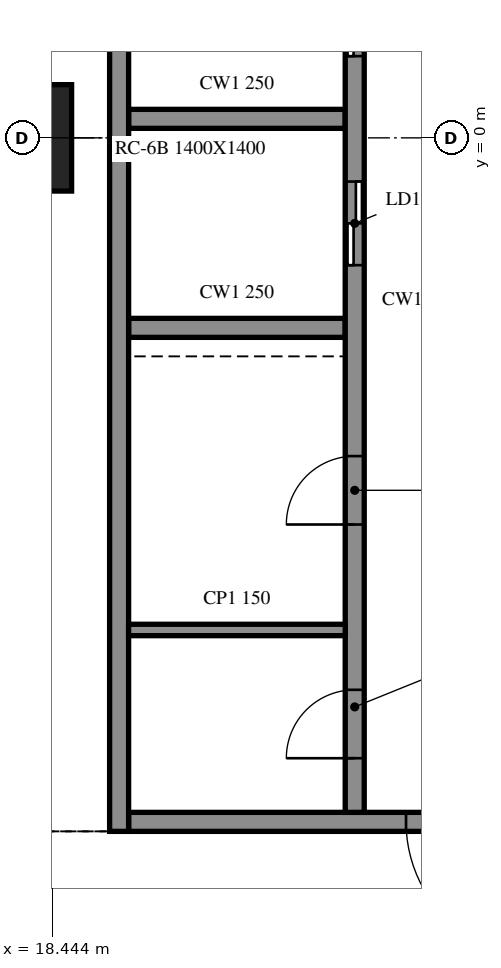
"""IFC4 building model, lengths in metres.
Left out: names, types, materials, properties, quantities, classifications, styles, units other than length and angle.
Written with IfcOpenShell. Run it as: python <this file> out.ifc"""

import sys

from ifc_helpers import new_model, si_unit, direction, frame, frame_2d, origin, origin_2d, place, context, subcontext, project, spatial, rectangle, extrude, element, fill, save


model = new_model("IFC4")
c1 = context("Model", 3, precision=1e-05, world=origin(), true_north=direction((0.0, 1.0)))
c2 = subcontext(c1, "Body", "Model", "MODEL_VIEW")
j1 = project(units=[si_unit("LENGTHUNIT", "METRE"), si_unit("PLANEANGLEUNIT", "RADIAN")], contexts=[c1])
p1 = place(None, origin())
s1 = spatial("IfcSite", under=j1, at=p1, CompositionType="ELEMENT")
p2 = place(p1, origin())
s2 = spatial("IfcBuilding", under=s1, at=p2, CompositionType="ELEMENT")
p3 = place(p2, frame((0.0, 0.0, 117.6)))
s3 = spatial("IfcBuildingStorey", under=s2, at=p3, CompositionType="ELEMENT", Elevation=117.6)
p4 = place(p3, frame((18.0, 0.0, -0.55), z_axis=(0.0, 0.0, 1.0), x_axis=(1.0, 0.0, 0.0)))
e1 = element("IfcColumn", 1, at=p4, inside=s3, PredefinedType="COLUMN", context=c2, shape_type="SweptSolid", body=[
    extrude(rectangle(XDim=1.4, YDim=1.4, at=origin_2d()), origin(), (0.0, 0.0, 1.0), 4.61),
])
p5 = place(p3, frame((19.325, 15.125, 0.0), z_axis=(0.0, 0.0, 1.0), x_axis=(0.0, -1.0, 0.0)))
e2 = element("IfcWall", 2, at=p5, inside=s3, PredefinedType="SOLIDWALL", context=c2, shape_type="SweptSolid", body=[
    extrude(rectangle(XDim=24.25, YDim=0.25, at=frame_2d((12.125, 0.0))), origin(), (0.0, 0.0, 1.0), 4.06),
])
p6 = place(p3, frame((28.55, -9.0, 0.0), z_axis=(0.0, 0.0, 1.0), x_axis=(-1.0, 0.0, 0.0)))
e3 = element("IfcWall", 3, at=p6, inside=s3, PredefinedType="SOLIDWALL", context=c2, shape_type="SweptSolid", body=[
    extrude(rectangle(XDim=9.1, YDim=0.25, at=frame_2d((4.55, 0.0))), origin(), (0.0, 0.0, 1.0), 4.06),
])
p7 = place(p6, frame((3.65, 0.0, 0.0)))
e4 = element("IfcOpeningElement", 4, at=p7, cuts=e3, PredefinedType="OPENING", context=c2, shape_type="SweptSolid", body=[
    extrude(rectangle(XDim=1.8, YDim=2.1, at=frame_2d((0.9, 1.05))), frame((0.0, 0.135, 0.0), z_axis=(0.0, -1.0, 0.0), x_axis=(1.0, 0.0, 0.0)), (0.0, 0.0, 1.0), 0.27),
])
p8 = place(p3, frame((22.425, -8.875, 0.0), z_axis=(0.0, 0.0, 1.0), x_axis=(0.0, 1.0, 0.0)))
e5 = element("IfcWall", 5, at=p8, inside=s3, PredefinedType="SOLIDWALL", context=c2, shape_type="SweptSolid", body=[
    extrude(rectangle(XDim=17.5, YDim=0.25, at=frame_2d((8.75, 0.0))), origin(), (0.0, 0.0, 1.0), 4.06),
])
p9 = place(p8, frame((7.2, 0.0, 0.0)))
e6 = element("IfcOpeningElement", 6, at=p9, cuts=e5, PredefinedType="OPENING", context=c2, shape_type="SweptSolid", body=[
    extrude(rectangle(XDim=1.1, YDim=2.1, at=frame_2d((0.55, 1.05))), frame((0.0, 0.135, 0.0), z_axis=(0.0, -1.0, 0.0), x_axis=(1.0, 0.0, 0.0)), (0.0, 0.0, 1.0), 0.27),
])
p10 = place(p8, frame((9.95, 0.0, 0.0)))
e7 = element("IfcOpeningElement", 7, at=p10, cuts=e5, PredefinedType="OPENING", context=c2, shape_type="SweptSolid", body=[
    extrude(rectangle(XDim=1.1, YDim=2.1, at=frame_2d((0.55, 1.05))), frame((0.0, 0.135, 0.0), z_axis=(0.0, -1.0, 0.0), x_axis=(1.0, 0.0, 0.0)), (0.0, 0.0, 1.0), 0.27),
])
p11 = place(p8, frame((12.7, 0.0, 0.0)))
e8 = element("IfcOpeningElement", 8, at=p11, cuts=e5, PredefinedType="OPENING", context=c2, shape_type="SweptSolid", body=[
    extrude(rectangle(XDim=1.1, YDim=2.1, at=frame_2d((0.55, 1.05))), frame((0.0, 0.135, 0.0), z_axis=(0.0, -1.0, 0.0), x_axis=(1.0, 0.0, 0.0)), (0.0, 0.0, 1.0), 0.27),
])
p12 = place(p8, frame((15.45, 0.0, 0.0)))
e9 = element("IfcOpeningElement", 9, at=p12, cuts=e5, PredefinedType="OPENING", context=c2, shape_type="SweptSolid", body=[
    extrude(rectangle(XDim=1.1, YDim=2.1, at=frame_2d((0.55, 1.05))), frame((0.0, 0.135, 0.0), z_axis=(0.0, -1.0, 0.0), x_axis=(1.0, 0.0, 0.0)), (0.0, 0.0, 1.0), 0.27),
])
p13 = place(p8, frame((0.712, 0.0, 0.0)))
e10 = element("IfcOpeningElement", 10, at=p13, cuts=e5, PredefinedType="OPENING", context=c2, shape_type="SweptSolid", body=[
    extrude(rectangle(XDim=0.9, YDim=2.1, at=frame_2d((0.45, 1.05))), frame((0.0, 0.135, 0.0), z_axis=(0.0, -1.0, 0.0), x_axis=(1.0, 0.0, 0.0)), (0.0, 0.0, 1.0), 0.27),
])
p14 = place(p8, frame((3.788, 0.0, 0.0)))
e11 = element("IfcOpeningElement", 11, at=p14, cuts=e5, PredefinedType="OPENING", context=c2, shape_type="SweptSolid", body=[
    extrude(rectangle(XDim=0.9, YDim=2.1, at=frame_2d((0.45, 1.05))), frame((0.0, 0.135, 0.0), z_axis=(0.0, -1.0, 0.0), x_axis=(1.0, 0.0, 0.0)), (0.0, 0.0, 1.0), 0.27),
])
for number, where, z_axis, x_axis in (
    (12, (19.45, -2.5, 0.0), (0.0, 0.0, 1.0), (1.0, 0.0, 0.0)),
    (13, (19.45, 0.25, 0.0), (0.0, 0.0, 1.0), (1.0, 0.0, 0.0)),
):
    element("IfcWall", number, at=place(p3, frame(where, z_axis=z_axis, x_axis=x_axis)), inside=s3, PredefinedType="SOLIDWALL", context=c2, shape_type="SweptSolid", body=[
        extrude(rectangle(XDim=2.85, YDim=0.25, at=frame_2d((1.425, 0.0))), origin(), (0.0, 0.0, 1.0), 4.06),
    ])
p15 = place(p3, frame((19.45, -6.475, 0.0), z_axis=(0.0, 0.0, 1.0), x_axis=(1.0, 0.0, 0.0)))
e14 = element("IfcWall", 14, at=p15, inside=s3, PredefinedType="PARTITIONING", context=c2, shape_type="SweptSolid", body=[
    extrude(rectangle(XDim=2.85, YDim=0.15, at=frame_2d((1.425, 0.0))), origin(), (0.0, 0.0, 1.0), 4.06),
])
p16 = place(p7, origin())
e15 = element("IfcDoor", 15, at=p16, inside=s3, OperationType="DOUBLE_DOOR_SINGLE_SWING", PredefinedType="DOOR", context=c2, shape_type="SweptSolid", body=[
    extrude(rectangle(XDim=1.8, YDim=2.1, at=frame_2d((0.9, 1.05))), frame((0.0, 0.025, 0.0), z_axis=(0.0, -1.0, 0.0), x_axis=(1.0, 0.0, 0.0)), (0.0, 0.0, 1.0), 0.05),
])
fill(e4, e15)
p17 = place(p9, origin())
e16 = element("IfcDoor", 16, at=p17, inside=s3, OperationType="DOUBLE_DOOR_SLIDING", PredefinedType="DOOR", context=c2, shape_type="SweptSolid", body=[
    extrude(rectangle(XDim=1.1, YDim=2.1, at=frame_2d((0.55, 1.05))), frame((0.0, 0.025, 0.0), z_axis=(0.0, -1.0, 0.0), x_axis=(1.0, 0.0, 0.0)), (0.0, 0.0, 1.0), 0.05),
])
fill(e6, e16)
p18 = place(p10, origin())
e17 = element("IfcDoor", 17, at=p18, inside=s3, OperationType="DOUBLE_DOOR_SLIDING", PredefinedType="DOOR", context=c2, shape_type="SweptSolid", body=[
    extrude(rectangle(XDim=1.1, YDim=2.1, at=frame_2d((0.55, 1.05))), frame((0.0, 0.025, 0.0), z_axis=(0.0, -1.0, 0.0), x_axis=(1.0, 0.0, 0.0)), (0.0, 0.0, 1.0), 0.05),
])
fill(e7, e17)
p19 = place(p13, origin())
e18 = element("IfcDoor", 18, at=p19, inside=s3, OperationType="SINGLE_SWING_LEFT", PredefinedType="DOOR", context=c2, shape_type="SweptSolid", body=[
    extrude(rectangle(XDim=0.9, YDim=2.1, at=frame_2d((0.45, 1.05))), frame((0.0, 0.025, 0.0), z_axis=(0.0, -1.0, 0.0), x_axis=(1.0, 0.0, 0.0)), (0.0, 0.0, 1.0), 0.05),
])
fill(e10, e18)
p20 = place(p14, origin())
e19 = element("IfcDoor", 19, at=p20, inside=s3, OperationType="SINGLE_SWING_RIGHT", PredefinedType="DOOR", context=c2, shape_type="SweptSolid", body=[
    extrude(rectangle(XDim=0.9, YDim=2.1, at=frame_2d((0.45, 1.05))), frame((0.0, 0.025, 0.0), z_axis=(0.0, -1.0, 0.0), x_axis=(1.0, 0.0, 0.0)), (0.0, 0.0, 1.0), 0.05),
])
fill(e11, e19)
save(model, sys.argv[1])
